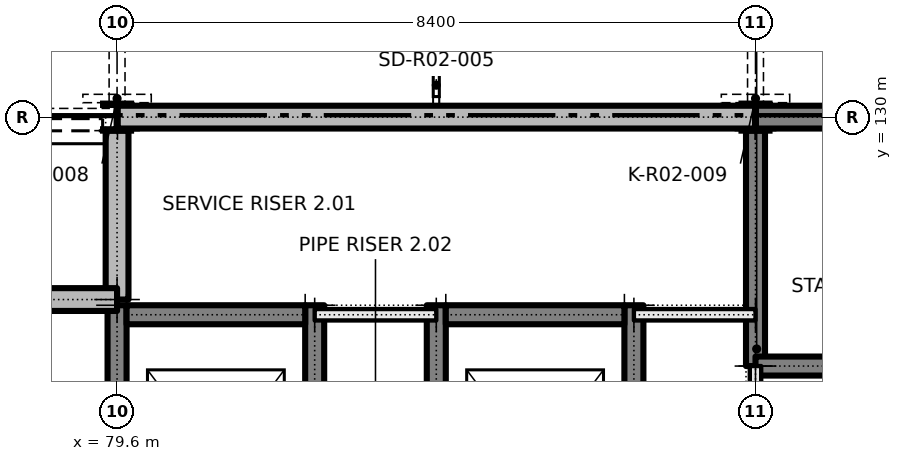
"""IFC4 building model, lengths in metres.
Left out: names, types, materials, properties, quantities, classifications, styles, units other than length and angle.
Written with IfcOpenShell. Run it as: python <this file> out.ifc"""

import sys

from ifc_helpers import new_model, si_unit, direction, frame, frame_2d, origin, origin_2d, place, context, subcontext, project, spatial, rectangle, i_section, extrude, element, save


model = new_model("IFC4")
c1 = context("Model", 3, precision=1e-05, world=origin(), true_north=direction((0.0, 1.0)))
c2 = subcontext(c1, "Body", "Model", "MODEL_VIEW")
j1 = project(units=[si_unit("LENGTHUNIT", "METRE"), si_unit("PLANEANGLEUNIT", "RADIAN")], contexts=[c1])
p1 = place(None, origin())
s1 = spatial("IfcSite", under=j1, at=p1, CompositionType="ELEMENT")
p2 = place(p1, origin())
s2 = spatial("IfcBuilding", under=s1, at=p2, CompositionType="ELEMENT")
p3 = place(p2, frame((0.0, 0.0, 10.2)))
s3 = spatial("IfcBuildingStorey", under=s2, at=p3, CompositionType="ELEMENT", Elevation=10.2)
for number, where, z_axis, x_axis in (
    (1, (79.6, 123.875, 0.0), (0.0, 0.0, 1.0), (0.0, 1.0, 0.0)),
    (2, (82.2, 123.875, 0.0), (0.0, 0.0, 1.0), (0.0, 1.0, 0.0)),
):
    element("IfcWall", number, at=place(p3, frame(where, z_axis=z_axis, x_axis=x_axis)), inside=s3, PredefinedType="SOLIDWALL", context=c2, shape_type="SweptSolid", body=[
        extrude(rectangle(XDim=3.65, YDim=0.25, at=frame_2d((1.825, 0.0))), origin(), (0.0, 0.0, 1.0), 4.8),
    ])
p4 = place(p3, frame((79.725, 127.4, 0.0), z_axis=(0.0, 0.0, 1.0), x_axis=(1.0, 0.0, 0.0)))
e3 = element("IfcWall", 3, at=p4, inside=s3, PredefinedType="SOLIDWALL", context=c2, shape_type="SweptSolid", body=[
    extrude(rectangle(XDim=2.35, YDim=0.25, at=frame_2d((1.175, 0.0))), origin(), (0.0, 0.0, 1.0), 4.8),
])
for number, where, z_axis, x_axis in (
    (4, (83.8, 123.875, 0.0), (0.0, 0.0, 1.0), (0.0, 1.0, 0.0)),
    (5, (86.4, 123.875, 0.0), (0.0, 0.0, 1.0), (0.0, 1.0, 0.0)),
):
    element("IfcWall", number, at=place(p3, frame(where, z_axis=z_axis, x_axis=x_axis)), inside=s3, PredefinedType="SOLIDWALL", context=c2, shape_type="SweptSolid", body=[
        extrude(rectangle(XDim=3.65, YDim=0.25, at=frame_2d((1.825, 0.0))), origin(), (0.0, 0.0, 1.0), 4.8),
    ])
p5 = place(p3, frame((83.925, 127.4, 0.0), z_axis=(0.0, 0.0, 1.0), x_axis=(1.0, 0.0, 0.0)))
e6 = element("IfcWall", 6, at=p5, inside=s3, PredefinedType="SOLIDWALL", context=c2, shape_type="SweptSolid", body=[
    extrude(rectangle(XDim=2.35, YDim=0.25, at=frame_2d((1.175, 0.0))), origin(), (0.0, 0.0, 1.0), 4.8),
])
for number, where, z_axis, x_axis in (
    (7, (79.6, 130.0, 0.0), (0.0, 0.0, 1.0), (1.0, 0.0, 0.0)),
    (8, (88.0, 130.0, 0.0), (0.0, 0.0, 1.0), (1.0, 0.0, 0.0)),
):
    element("IfcColumn", number, at=place(p3, frame(where, z_axis=z_axis, x_axis=x_axis)), inside=s3, PredefinedType="COLUMN", context=c2, shape_type="SweptSolid", body=[
        extrude(i_section(OverallWidth=0.368, OverallDepth=0.356, WebThickness=0.011, FlangeThickness=0.018, FilletRadius=0.015, at=origin_2d()), origin(), (0.0, 0.0, 1.0), 4.8),
    ])
p6 = place(p3, frame((88.0, 126.725, 0.0), z_axis=(0.0, 0.0, 1.0), x_axis=(0.0, 1.0, 0.0)))
e9 = element("IfcWall", 9, at=p6, inside=s3, PredefinedType="SHEAR", context=c2, shape_type="SweptSolid", body=[
    extrude(rectangle(XDim=3.097, YDim=0.25, at=frame_2d((1.549, 0.0))), origin(), (0.0, 0.0, 1.0), 4.8),
])
p7 = place(p3, frame((88.0, 126.725, 0.0), z_axis=(0.0, 0.0, 1.0), x_axis=(1.0, 0.0, 0.0)))
e10 = element("IfcWall", 10, at=p7, inside=s3, PredefinedType="SHEAR", context=c2, shape_type="SweptSolid", body=[
    extrude(rectangle(XDim=8.4, YDim=0.25, at=frame_2d((4.2, 0.0))), origin(), (0.0, 0.0, 1.0), 4.8),
])
p8 = place(p7, frame((6.625, 0.0, 0.0)))
e11 = element("IfcOpeningElement", 11, at=p8, cuts=e10, PredefinedType="OPENING", context=c2, shape_type="SweptSolid", body=[
    extrude(rectangle(XDim=1.2, YDim=2.1, at=frame_2d((0.6, 1.05))), frame((0.0, 0.135, 0.0), z_axis=(0.0, -1.0, 0.0), x_axis=(1.0, 0.0, 0.0)), (0.0, 0.0, 1.0), 0.27),
])
p9 = place(p3, frame((87.994, 130.0, 0.0), z_axis=(0.0, 0.0, 1.0), x_axis=(1.0, 0.0, 0.0)))
e12 = element("IfcWall", 12, at=p9, inside=s3, PredefinedType="SHEAR", context=c2, shape_type="SweptSolid", body=[
    extrude(rectangle(XDim=8.411, YDim=0.3, at=frame_2d((4.206, 0.0))), origin(), (0.0, 0.0, 1.0), 4.8),
])
p10 = place(p3, frame((79.605, 130.0, 0.0), z_axis=(0.0, 0.0, 1.0), x_axis=(1.0, 0.0, 0.0)))
e13 = element("IfcWall", 13, at=p10, inside=s3, PredefinedType="SOLIDWALL", context=c2, shape_type="SweptSolid", body=[
    extrude(rectangle(XDim=8.4, YDim=0.3, at=frame_2d((4.2, 0.0))), origin(), (0.0, 0.0, 1.0), 4.008),
])
p11 = place(p3, frame((79.6, 127.6, 0.0), z_axis=(0.0, 0.0, 1.0), x_axis=(0.0, 1.0, 0.0)))
e14 = element("IfcWall", 14, at=p11, inside=s3, PredefinedType="SOLIDWALL", context=c2, shape_type="SweptSolid", body=[
    extrude(rectangle(XDim=2.222, YDim=0.3, at=frame_2d((1.111, 0.0))), origin(), (0.0, 0.0, 1.0), 4.087),
])
p12 = place(p3, frame((88.0, 124.0, 0.0), z_axis=(0.0, 0.0, 1.0), x_axis=(0.0, 1.0, 0.0)))
e15 = element("IfcWall", 15, at=p12, inside=s3, PredefinedType="PARTITIONING", context=c2, shape_type="SweptSolid", body=[
    extrude(rectangle(XDim=2.725, YDim=0.15, at=frame_2d((1.363, 0.0))), origin(), (0.0, 0.0, 1.0), 4.087),
])
for number, where, z_axis, x_axis in (
    (16, (82.2, 127.4, 0.0), (0.0, 0.0, 1.0), (1.0, 0.0, 0.0)),
    (17, (86.4, 127.4, 0.0), (0.0, 0.0, 1.0), (1.0, 0.0, 0.0)),
):
    element("IfcWall", number, at=place(p3, frame(where, z_axis=z_axis, x_axis=x_axis)), inside=s3, PredefinedType="PARTITIONING", context=c2, shape_type="SweptSolid", body=[
        extrude(rectangle(XDim=1.6, YDim=0.15, at=frame_2d((0.8, 0.0))), origin(), (0.0, 0.0, 1.0), 4.8),
    ])
p13 = place(p3, frame((62.8, 127.6, 0.0), z_axis=(0.0, 0.0, 1.0), x_axis=(1.0, 0.0, 0.0)))
e18 = element("IfcWall", 18, at=p13, inside=s3, PredefinedType="SOLIDWALL", context=c2, shape_type="SweptSolid", body=[
    extrude(rectangle(XDim=16.8, YDim=0.3, at=frame_2d((8.4, 0.0))), origin(), (0.0, 0.0, 1.0), 4.8),
])
p14 = place(p13, frame((7.45, 0.0, 0.0)))
e19 = element("IfcOpeningElement", 19, at=p14, cuts=e18, PredefinedType="OPENING", context=c2, shape_type="SweptSolid", body=[
    extrude(rectangle(XDim=1.8, YDim=2.1, at=frame_2d((0.9, 1.05))), frame((0.0, 0.16, 0.0), z_axis=(0.0, -1.0, 0.0), x_axis=(1.0, 0.0, 0.0)), (0.0, 0.0, 1.0), 0.32),
])
p15 = place(p13, frame((0.9, 0.0, 0.95)))
e20 = element("IfcOpeningElement", 20, at=p15, cuts=e18, PredefinedType="OPENING", context=c2, shape_type="SweptSolid", body=[
    extrude(rectangle(XDim=2.4, YDim=1.8, at=frame_2d((1.2, 0.9))), frame((0.0, 0.16, 0.0), z_axis=(0.0, -1.0, 0.0), x_axis=(1.0, 0.0, 0.0)), (0.0, 0.0, 1.0), 0.32),
])
p16 = place(p13, frame((13.5, 0.0, 0.95)))
e21 = element("IfcOpeningElement", 21, at=p16, cuts=e18, PredefinedType="OPENING", context=c2, shape_type="SweptSolid", body=[
    extrude(rectangle(XDim=2.4, YDim=1.8, at=frame_2d((1.2, 0.9))), frame((0.0, 0.16, 0.0), z_axis=(0.0, -1.0, 0.0), x_axis=(1.0, 0.0, 0.0)), (0.0, 0.0, 1.0), 0.32),
])
save(model, sys.argv[1])
